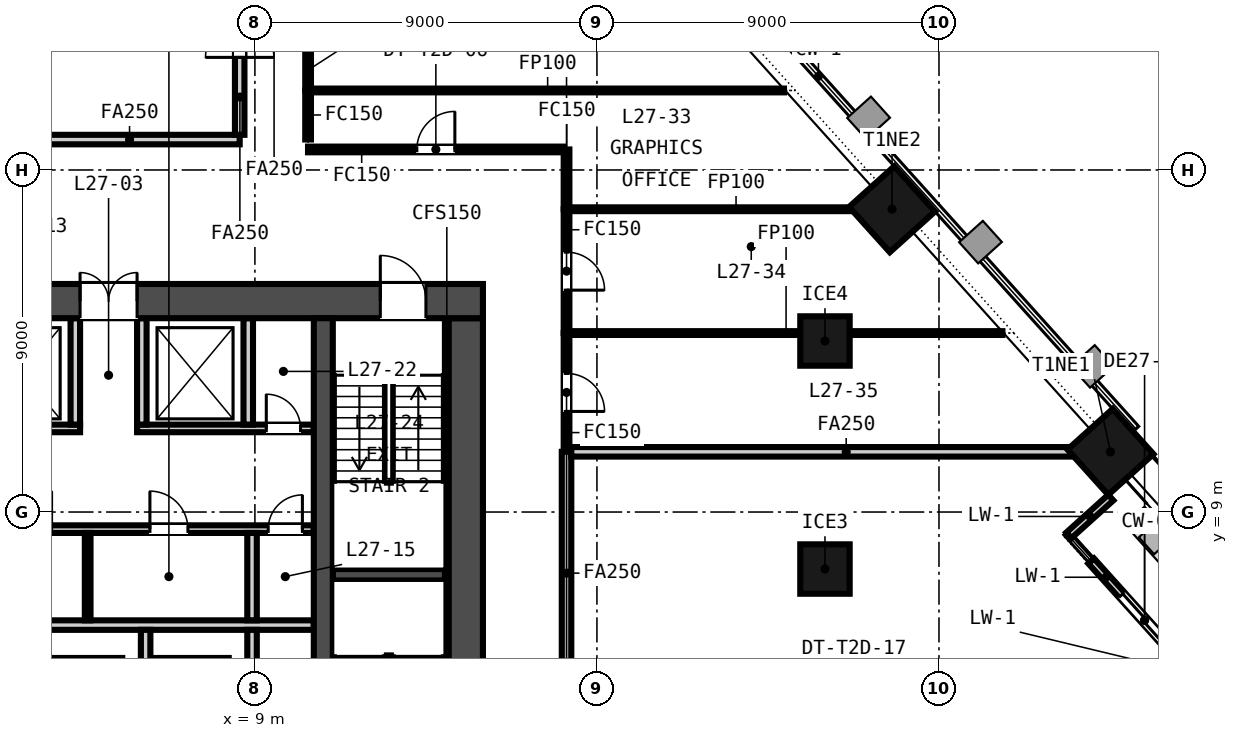
"""IFC4 building model, lengths in metres.
Left out: names, types, materials, properties, quantities, classifications, styles, units other than length and angle.
Written with IfcOpenShell. Run it as: python <this file> out.ifc"""

import sys

from ifc_helpers import new_model, si_unit, direction, frame, frame_2d, origin, origin_2d, place, context, subcontext, project, spatial, rectangle, extrude, element, fill, save


model = new_model("IFC4")
c1 = context("Model", 3, precision=1e-05, world=origin(), true_north=direction((0.0, 1.0)))
c2 = subcontext(c1, "Body", "Model", "MODEL_VIEW")
j1 = project(units=[si_unit("LENGTHUNIT", "METRE"), si_unit("PLANEANGLEUNIT", "RADIAN")], contexts=[c1])
p1 = place(None, origin())
s1 = spatial("IfcSite", under=j1, at=p1, CompositionType="ELEMENT")
p2 = place(p1, origin())
s2 = spatial("IfcBuilding", under=s1, at=p2, CompositionType="ELEMENT")
p3 = place(p2, frame((0.0, 0.0, 113.5)))
s3 = spatial("IfcBuildingStorey", under=s2, at=p3, CompositionType="ELEMENT", Elevation=113.5)
p4 = place(p3, frame((-15.0, 14.55, -0.15), z_axis=(0.0, 0.0, 1.0), x_axis=(1.0, 0.0, 0.0)))
e1 = element("IfcWall", 1, at=p4, inside=s3, PredefinedType="SOLIDWALL", context=c2, shape_type="SweptSolid", body=[
    extrude(rectangle(XDim=30.0, YDim=0.9, at=frame_2d((15.0, 0.0))), origin(), (0.0, 0.0, 1.0), 3.5),
])
p5 = place(p4, frame((9.25, 0.0, 0.15)))
e2 = element("IfcOpeningElement", 2, at=p5, cuts=e1, PredefinedType="OPENING", context=c2, shape_type="SweptSolid", body=[
    extrude(rectangle(XDim=1.5, YDim=2.1, at=frame_2d((0.75, 1.05))), frame((0.0, 0.46, 0.0), z_axis=(0.0, -1.0, 0.0), x_axis=(1.0, 0.0, 0.0)), (0.0, 0.0, 1.0), 0.92),
])
p6 = place(p4, frame((19.4, 0.0, 0.15)))
e3 = element("IfcOpeningElement", 3, at=p6, cuts=e1, PredefinedType="OPENING", context=c2, shape_type="SweptSolid", body=[
    extrude(rectangle(XDim=1.5, YDim=2.1, at=frame_2d((0.75, 1.05))), frame((0.0, 0.46, 0.0), z_axis=(0.0, -1.0, 0.0), x_axis=(1.0, 0.0, 0.0)), (0.0, 0.0, 1.0), 0.92),
])
p7 = place(p4, frame((1.5, 0.0, 0.15)))
e4 = element("IfcOpeningElement", 4, at=p7, cuts=e1, PredefinedType="OPENING", context=c2, shape_type="SweptSolid", body=[
    extrude(rectangle(XDim=1.2, YDim=2.1, at=frame_2d((0.6, 1.05))), frame((0.0, 0.46, 0.0), z_axis=(0.0, -1.0, 0.0), x_axis=(1.0, 0.0, 0.0)), (0.0, 0.0, 1.0), 0.92),
])
p8 = place(p4, frame((27.3, 0.0, 0.15)))
e5 = element("IfcOpeningElement", 5, at=p8, cuts=e1, PredefinedType="OPENING", context=c2, shape_type="SweptSolid", body=[
    extrude(rectangle(XDim=1.2, YDim=2.1, at=frame_2d((0.6, 1.05))), frame((0.0, 0.46, 0.0), z_axis=(0.0, -1.0, 0.0), x_axis=(1.0, 0.0, 0.0)), (0.0, 0.0, 1.0), 0.92),
])
p9 = place(p3, frame((14.55, 0.9, -0.15), z_axis=(0.0, 0.0, 1.0), x_axis=(0.0, 1.0, 0.0)))
e6 = element("IfcWall", 6, at=p9, inside=s3, PredefinedType="SOLIDWALL", context=c2, shape_type="SweptSolid", body=[
    extrude(rectangle(XDim=13.2, YDim=0.9, at=frame_2d((6.6, 0.0))), origin(), (0.0, 0.0, 1.0), 3.5),
])
p10 = place(p3, frame((10.8, 0.9, -0.15), z_axis=(0.0, 0.0, 1.0), x_axis=(0.0, 1.0, 0.0)))
e7 = element("IfcWall", 7, at=p10, inside=s3, PredefinedType="SOLIDWALL", context=c2, shape_type="SweptSolid", body=[
    extrude(rectangle(XDim=13.2, YDim=0.5, at=frame_2d((6.6, 0.0))), origin(), (0.0, 0.0, 1.0), 3.5),
])
for number, where, z_axis, x_axis in (
    (8, (31.513, 10.584, -0.15), (0.0, 0.0, 1.0), (-0.669, 0.743, 0.0)),
    (9, (25.765, 16.967, -0.15), (0.0, 0.0, 1.0), (-0.669, 0.743, 0.0)),
):
    element("IfcColumn", number, at=place(p3, frame(where, z_axis=z_axis, x_axis=x_axis)), inside=s3, PredefinedType="COLUMN", context=c2, shape_type="SweptSolid", body=[
        extrude(rectangle(XDim=1.6, YDim=1.6, at=origin_2d()), origin(), (0.0, 0.0, 1.0), 3.5),
    ])
for number, where, z_axis, x_axis in (
    (10, (24.0, 7.5, -0.15), (0.0, 0.0, 1.0), (1.0, 0.0, 0.0)),
    (11, (24.0, 13.5, -0.15), (0.0, 0.0, 1.0), (1.0, 0.0, 0.0)),
):
    element("IfcColumn", number, at=place(p3, frame(where, z_axis=z_axis, x_axis=x_axis)), inside=s3, PredefinedType="COLUMN", context=c2, shape_type="SweptSolid", body=[
        extrude(rectangle(XDim=1.3, YDim=1.3, at=origin_2d()), origin(), (0.0, 0.0, 1.0), 3.5),
    ])
p11 = place(p3, frame((33.815, 4.59, 0.0), z_axis=(0.0, 0.0, 1.0), x_axis=(-0.669138140895, 0.743138041282, 0.0)))
e12 = element("IfcWall", 12, at=p11, inside=s3, PredefinedType="SOLIDWALL", context=c2, shape_type="SweptSolid", body=[
    extrude(rectangle(XDim=4.2, YDim=0.2, at=frame_2d((2.1, 0.0))), origin(), (0.0, 0.0, 1.0), 2.671),
])
p12 = place(p11, frame((1.2, 0.0, 0.0)))
e13 = element("IfcOpeningElement", 13, at=p12, cuts=e12, PredefinedType="OPENING", context=c2, shape_type="SweptSolid", body=[
    extrude(rectangle(XDim=1.8, YDim=2.4, at=frame_2d((0.9, 1.2))), frame((0.0, 0.11, 0.0), z_axis=(0.0, -1.0, 0.0), x_axis=(1.0, 0.0, 0.0)), (0.0, 0.0, 1.0), 0.22),
])
p13 = place(p3, frame((31.521, 9.38, 0.0), z_axis=(0.0, 0.0, 1.0), x_axis=(-0.743073249722, -0.669210090739, 0.0)))
e14 = element("IfcWall", 14, at=p13, inside=s3, PredefinedType="SOLIDWALL", context=c2, shape_type="SweptSolid", body=[
    extrude(rectangle(XDim=1.484, YDim=0.2, at=frame_2d((0.742, 0.0))), origin(), (0.0, 0.0, 1.0), 2.9),
])
p14 = place(p3, frame((-10.55, 6.025, 0.0), z_axis=(0.0, 0.0, 1.0), x_axis=(1.0, 0.0, 0.0)))
e15 = element("IfcWall", 15, at=p14, inside=s3, PredefinedType="PARTITIONING", context=c2, shape_type="SweptSolid", body=[
    extrude(rectangle(XDim=21.1, YDim=0.25, at=frame_2d((10.55, 0.0))), origin(), (0.0, 0.0, 1.0), 3.35),
])
p15 = place(p3, frame((-4.125, 8.55, 0.0), z_axis=(0.0, 0.0, 1.0), x_axis=(1.0, 0.0, 0.0)))
e16 = element("IfcWall", 16, at=p15, inside=s3, PredefinedType="PARTITIONING", context=c2, shape_type="SweptSolid", body=[
    extrude(rectangle(XDim=14.675, YDim=0.2, at=frame_2d((7.337, 0.0))), origin(), (0.0, 0.0, 1.0), 3.35),
])
p16 = place(p15, frame((2.438, 0.0, 0.0)))
e17 = element("IfcOpeningElement", 17, at=p16, cuts=e16, PredefinedType="OPENING", context=c2, shape_type="SweptSolid", body=[
    extrude(rectangle(XDim=1.0, YDim=2.1, at=frame_2d((0.5, 1.05))), frame((0.0, 0.11, 0.0), z_axis=(0.0, -1.0, 0.0), x_axis=(1.0, 0.0, 0.0)), (0.0, 0.0, 1.0), 0.22),
])
p17 = place(p15, frame((6.775, 0.0, 0.0)))
e18 = element("IfcOpeningElement", 18, at=p17, cuts=e16, PredefinedType="OPENING", context=c2, shape_type="SweptSolid", body=[
    extrude(rectangle(XDim=1.0, YDim=2.1, at=frame_2d((0.5, 1.05))), frame((0.0, 0.11, 0.0), z_axis=(0.0, -1.0, 0.0), x_axis=(1.0, 0.0, 0.0)), (0.0, 0.0, 1.0), 0.22),
])
p18 = place(p15, frame((10.363, 0.0, 0.0)))
e19 = element("IfcOpeningElement", 19, at=p18, cuts=e16, PredefinedType="OPENING", context=c2, shape_type="SweptSolid", body=[
    extrude(rectangle(XDim=1.0, YDim=2.1, at=frame_2d((0.5, 1.05))), frame((0.0, 0.11, 0.0), z_axis=(0.0, -1.0, 0.0), x_axis=(1.0, 0.0, 0.0)), (0.0, 0.0, 1.0), 0.22),
])
p19 = place(p15, frame((13.475, 0.0, 0.0)))
e20 = element("IfcOpeningElement", 20, at=p19, cuts=e16, PredefinedType="OPENING", context=c2, shape_type="SweptSolid", body=[
    extrude(rectangle(XDim=0.9, YDim=2.1, at=frame_2d((0.45, 1.05))), frame((0.0, 0.11, 0.0), z_axis=(0.0, -1.0, 0.0), x_axis=(1.0, 0.0, 0.0)), (0.0, 0.0, 1.0), 0.22),
])
p20 = place(p3, frame((-4.25, 11.2, 0.0), z_axis=(0.0, 0.0, 1.0), x_axis=(1.0, 0.0, 0.0)))
e21 = element("IfcWall", 21, at=p20, inside=s3, PredefinedType="PARTITIONING", context=c2, shape_type="SweptSolid", body=[
    extrude(rectangle(XDim=8.65, YDim=0.2, at=frame_2d((4.325, 0.0))), origin(), (0.0, 0.0, 1.0), 3.35),
])
p21 = place(p20, frame((0.825, 0.0, 0.0)))
e22 = element("IfcOpeningElement", 22, at=p21, cuts=e21, PredefinedType="OPENING", context=c2, shape_type="SweptSolid", body=[
    extrude(rectangle(XDim=1.4, YDim=2.1, at=frame_2d((0.7, 1.05))), frame((0.0, 0.11, 0.0), z_axis=(0.0, -1.0, 0.0), x_axis=(1.0, 0.0, 0.0)), (0.0, 0.0, 1.0), 0.22),
])
p22 = place(p20, frame((3.625, 0.0, 0.0)))
e23 = element("IfcOpeningElement", 23, at=p22, cuts=e21, PredefinedType="OPENING", context=c2, shape_type="SweptSolid", body=[
    extrude(rectangle(XDim=1.4, YDim=2.1, at=frame_2d((0.7, 1.05))), frame((0.0, 0.11, 0.0), z_axis=(0.0, -1.0, 0.0), x_axis=(1.0, 0.0, 0.0)), (0.0, 0.0, 1.0), 0.22),
])
p23 = place(p3, frame((5.9, 11.2, 0.0), z_axis=(0.0, 0.0, 1.0), x_axis=(1.0, 0.0, 0.0)))
e24 = element("IfcWall", 24, at=p23, inside=s3, PredefinedType="PARTITIONING", context=c2, shape_type="SweptSolid", body=[
    extrude(rectangle(XDim=4.65, YDim=0.2, at=frame_2d((2.325, 0.0))), origin(), (0.0, 0.0, 1.0), 3.35),
])
p24 = place(p23, frame((3.4, 0.0, 0.0)))
e25 = element("IfcOpeningElement", 25, at=p24, cuts=e24, PredefinedType="OPENING", context=c2, shape_type="SweptSolid", body=[
    extrude(rectangle(XDim=0.9, YDim=2.1, at=frame_2d((0.45, 1.05))), frame((0.0, 0.11, 0.0), z_axis=(0.0, -1.0, 0.0), x_axis=(1.0, 0.0, 0.0)), (0.0, 0.0, 1.0), 0.22),
])
for number, where, z_axis, x_axis in (
    (26, (6.125, 3.6, 0.0), (0.0, 0.0, 1.0), (0.0, 1.0, 0.0)),
    (27, (8.925, 3.6, 0.0), (0.0, 0.0, 1.0), (0.0, 1.0, 0.0)),
):
    element("IfcWall", number, at=place(p3, frame(where, z_axis=z_axis, x_axis=x_axis)), inside=s3, PredefinedType="PARTITIONING", context=c2, shape_type="SweptSolid", body=[
        extrude(rectangle(XDim=2.3, YDim=0.25, at=frame_2d((1.15, 0.0))), origin(), (0.0, 0.0, 1.0), 3.35),
    ])
p25 = place(p3, frame((4.6, 6.15, 0.0), z_axis=(0.0, 0.0, 1.0), x_axis=(0.0, 1.0, 0.0)))
e28 = element("IfcWall", 28, at=p25, inside=s3, PredefinedType="PARTITIONING", context=c2, shape_type="SweptSolid", body=[
    extrude(rectangle(XDim=2.3, YDim=0.15, at=frame_2d((1.15, 0.0))), origin(), (0.0, 0.0, 1.0), 3.35),
])
p26 = place(p3, frame((8.925, 6.15, 0.0), z_axis=(0.0, 0.0, 1.0), x_axis=(0.0, 1.0, 0.0)))
e29 = element("IfcWall", 29, at=p26, inside=s3, PredefinedType="PARTITIONING", context=c2, shape_type="SweptSolid", body=[
    extrude(rectangle(XDim=2.3, YDim=0.25, at=frame_2d((1.15, 0.0))), origin(), (0.0, 0.0, 1.0), 3.35),
])
for number, where, z_axis, x_axis in (
    (30, (4.275, 11.3, 0.0), (0.0, 0.0, 1.0), (0.0, 1.0, 0.0)),
    (31, (6.025, 11.3, 0.0), (0.0, 0.0, 1.0), (0.0, 1.0, 0.0)),
    (32, (8.825, 11.3, 0.0), (0.0, 0.0, 1.0), (0.0, 1.0, 0.0)),
):
    element("IfcWall", number, at=place(p3, frame(where, z_axis=z_axis, x_axis=x_axis)), inside=s3, PredefinedType="PARTITIONING", context=c2, shape_type="SweptSolid", body=[
        extrude(rectangle(XDim=2.8, YDim=0.25, at=frame_2d((1.4, 0.0))), origin(), (0.0, 0.0, 1.0), 3.35),
    ])
p27 = place(p3, frame((11.05, 7.35, 0.0), z_axis=(0.0, 0.0, 1.0), x_axis=(1.0, 0.0, 0.0)))
e33 = element("IfcWall", 33, at=p27, inside=s3, PredefinedType="SOLIDWALL", context=c2, shape_type="SweptSolid", body=[
    extrude(rectangle(XDim=2.95, YDim=0.3, at=frame_2d((1.475, 0.0))), origin(), (0.0, 0.0, 1.0), 3.35),
])
p28 = place(p3, frame((14.05, 0.9, 0.0), z_axis=(0.0, 0.0, 1.0), x_axis=(0.0, 1.0, 0.0)))
e34 = element("IfcWall", 34, at=p28, inside=s3, PredefinedType="SOLIDWALL", context=c2, shape_type="SweptSolid", body=[
    extrude(rectangle(XDim=13.2, YDim=0.1, at=frame_2d((6.6, 0.0))), origin(), (0.0, 0.0, 1.0), 3.35),
])
p29 = place(p3, frame((10.4, 23.35, 0.0), z_axis=(0.0, 0.0, 1.0), x_axis=(0.0, -1.0, 0.0)))
e35 = element("IfcWall", 35, at=p29, inside=s3, PredefinedType="PARTITIONING", context=c2, shape_type="SweptSolid", body=[
    extrude(rectangle(XDim=3.258, YDim=0.15, at=frame_2d((1.629, 0.0))), origin(), (0.0, 0.0, 1.0), 2.591),
])
p30 = place(p29, frame((1.129, 0.0, 0.0)))
e36 = element("IfcOpeningElement", 36, at=p30, cuts=e35, PredefinedType="OPENING", context=c2, shape_type="SweptSolid", body=[
    extrude(rectangle(XDim=1.0, YDim=2.1, at=frame_2d((0.5, 1.05))), frame((0.0, 0.085, 0.0), z_axis=(0.0, -1.0, 0.0), x_axis=(1.0, 0.0, 0.0)), (0.0, 0.0, 1.0), 0.17),
])
p31 = place(p3, frame((10.4, 20.092, 0.0), z_axis=(0.0, 0.0, 1.0), x_axis=(0.0, -1.0, 0.0)))
e37 = element("IfcWall", 37, at=p31, inside=s3, PredefinedType="PARTITIONING", context=c2, shape_type="SweptSolid", body=[
    extrude(rectangle(XDim=1.29, YDim=0.15, at=frame_2d((0.645, 0.0))), origin(), (0.0, 0.0, 1.0), 2.591),
])
p32 = place(p3, frame((17.2, 18.54, 0.0), z_axis=(0.0, 0.0, 1.0), x_axis=(0.0, -1.0, 0.0)))
e38 = element("IfcWall", 38, at=p32, inside=s3, PredefinedType="PARTITIONING", context=c2, shape_type="SweptSolid", body=[
    extrude(rectangle(XDim=1.573, YDim=0.15, at=frame_2d((0.787, 0.0))), origin(), (0.0, 0.0, 1.0), 2.591),
])
p33 = place(p3, frame((17.2, 16.967, 0.0), z_axis=(0.0, 0.0, 1.0), x_axis=(0.0, -1.0, 0.0)))
e39 = element("IfcWall", 39, at=p33, inside=s3, PredefinedType="PARTITIONING", context=c2, shape_type="SweptSolid", body=[
    extrude(rectangle(XDim=3.258, YDim=0.15, at=frame_2d((1.629, 0.0))), origin(), (0.0, 0.0, 1.0), 2.591),
])
p34 = place(p33, frame((1.129, 0.0, 0.0)))
e40 = element("IfcOpeningElement", 40, at=p34, cuts=e39, PredefinedType="OPENING", context=c2, shape_type="SweptSolid", body=[
    extrude(rectangle(XDim=1.0, YDim=2.1, at=frame_2d((0.5, 1.05))), frame((0.0, 0.085, 0.0), z_axis=(0.0, -1.0, 0.0), x_axis=(1.0, 0.0, 0.0)), (0.0, 0.0, 1.0), 0.17),
])
p35 = place(p3, frame((17.2, 13.709, 0.0), z_axis=(0.0, 0.0, 1.0), x_axis=(0.0, -1.0, 0.0)))
e41 = element("IfcWall", 41, at=p35, inside=s3, PredefinedType="PARTITIONING", context=c2, shape_type="SweptSolid", body=[
    extrude(rectangle(XDim=3.125, YDim=0.15, at=frame_2d((1.562, 0.0))), origin(), (0.0, 0.0, 1.0), 2.591),
])
p36 = place(p35, frame((1.062, 0.0, 0.0)))
e42 = element("IfcOpeningElement", 42, at=p36, cuts=e41, PredefinedType="OPENING", context=c2, shape_type="SweptSolid", body=[
    extrude(rectangle(XDim=1.0, YDim=2.1, at=frame_2d((0.5, 1.05))), frame((0.0, 0.085, 0.0), z_axis=(0.0, -1.0, 0.0), x_axis=(1.0, 0.0, 0.0)), (0.0, 0.0, 1.0), 0.17),
])
p37 = place(p3, frame((17.2, 10.584, 0.0), z_axis=(0.0, 0.0, 1.0), x_axis=(0.0, -1.0, 0.0)))
e43 = element("IfcWall", 43, at=p37, inside=s3, PredefinedType="PARTITIONING", context=c2, shape_type="SweptSolid", body=[
    extrude(rectangle(XDim=6.384, YDim=0.25, at=frame_2d((3.192, 0.0))), origin(), (0.0, 0.0, 1.0), 2.591),
])
p38 = place(p3, frame((-4.912, 18.8, 0.0), z_axis=(0.0, 0.0, 1.0), x_axis=(1.0, 0.0, 0.0)))
e44 = element("IfcWall", 44, at=p38, inside=s3, PredefinedType="PARTITIONING", context=c2, shape_type="SweptSolid", body=[
    extrude(rectangle(XDim=13.512, YDim=0.25, at=frame_2d((6.756, 0.0))), origin(), (0.0, 0.0, 1.0), 2.591),
])
p39 = place(p38, frame((5.856, 0.0, 0.0)))
e45 = element("IfcOpeningElement", 45, at=p39, cuts=e44, PredefinedType="OPENING", context=c2, shape_type="SweptSolid", body=[
    extrude(rectangle(XDim=1.8, YDim=2.1, at=frame_2d((0.9, 1.05))), frame((0.0, 0.135, 0.0), z_axis=(0.0, -1.0, 0.0), x_axis=(1.0, 0.0, 0.0)), (0.0, 0.0, 1.0), 0.27),
])
p40 = place(p3, frame((8.6, 18.925, 0.0), z_axis=(0.0, 0.0, 1.0), x_axis=(0.0, 1.0, 0.0)))
e46 = element("IfcWall", 46, at=p40, inside=s3, PredefinedType="PARTITIONING", context=c2, shape_type="SweptSolid", body=[
    extrude(rectangle(XDim=5.875, YDim=0.25, at=frame_2d((2.938, 0.0))), origin(), (0.0, 0.0, 1.0), 2.591),
])
p41 = place(p40, frame((2.038, 0.0, 0.0)))
e47 = element("IfcOpeningElement", 47, at=p41, cuts=e46, PredefinedType="OPENING", context=c2, shape_type="SweptSolid", body=[
    extrude(rectangle(XDim=1.8, YDim=2.1, at=frame_2d((0.9, 1.05))), frame((0.0, 0.135, 0.0), z_axis=(0.0, -1.0, 0.0), x_axis=(1.0, 0.0, 0.0)), (0.0, 0.0, 1.0), 0.27),
])
p42 = place(p3, frame((10.475, 20.092, 0.0), z_axis=(0.0, 0.0, 1.0), x_axis=(1.0, 0.0, 0.0)))
e48 = element("IfcWall", 48, at=p42, inside=s3, PredefinedType="PARTITIONING", context=c2, shape_type="SweptSolid", body=[
    extrude(rectangle(XDim=12.446, YDim=0.1, at=frame_2d((6.223, 0.0))), origin(), (0.0, 0.0, 1.0), 2.591),
])
p43 = place(p3, frame((10.398, 18.54, 0.0), z_axis=(0.0, 0.0, 1.0), x_axis=(1.0, 0.0, 0.0)))
e49 = element("IfcWall", 49, at=p43, inside=s3, PredefinedType="PARTITIONING", context=c2, shape_type="SweptSolid", body=[
    extrude(rectangle(XDim=6.727, YDim=0.15, at=frame_2d((3.364, 0.0))), origin(), (0.0, 0.0, 1.0), 2.591),
])
p44 = place(p43, frame((2.864, 0.0, 0.0)))
e50 = element("IfcOpeningElement", 50, at=p44, cuts=e49, PredefinedType="OPENING", context=c2, shape_type="SweptSolid", body=[
    extrude(rectangle(XDim=1.0, YDim=2.1, at=frame_2d((0.5, 1.05))), frame((0.0, 0.085, 0.0), z_axis=(0.0, -1.0, 0.0), x_axis=(1.0, 0.0, 0.0)), (0.0, 0.0, 1.0), 0.17),
])
p45 = place(p3, frame((17.275, 16.967, 0.0), z_axis=(0.0, 0.0, 1.0), x_axis=(1.0, 0.0, 0.0)))
e51 = element("IfcWall", 51, at=p45, inside=s3, PredefinedType="PARTITIONING", context=c2, shape_type="SweptSolid", body=[
    extrude(rectangle(XDim=8.76, YDim=0.1, at=frame_2d((4.38, 0.0))), origin(), (0.0, 0.0, 1.0), 2.591),
])
p46 = place(p3, frame((17.275, 13.709, 0.0), z_axis=(0.0, 0.0, 1.0), x_axis=(1.0, 0.0, 0.0)))
e52 = element("IfcWall", 52, at=p46, inside=s3, PredefinedType="PARTITIONING", context=c2, shape_type="SweptSolid", body=[
    extrude(rectangle(XDim=11.393, YDim=0.1, at=frame_2d((5.697, 0.0))), origin(), (0.0, 0.0, 1.0), 2.591),
])
p47 = place(p3, frame((17.325, 10.584, 0.0), z_axis=(0.0, 0.0, 1.0), x_axis=(1.0, 0.0, 0.0)))
e53 = element("IfcWall", 53, at=p47, inside=s3, PredefinedType="PARTITIONING", context=c2, shape_type="SweptSolid", body=[
    extrude(rectangle(XDim=14.457, YDim=0.25, at=frame_2d((7.229, 0.0))), origin(), (0.0, 0.0, 1.0), 2.591),
])
p48 = place(p12, origin())
e54 = element("IfcDoor", 54, at=p48, inside=s3, OperationType="SINGLE_SWING_LEFT", PredefinedType="DOOR", context=c2, shape_type="SweptSolid", body=[
    extrude(rectangle(XDim=1.8, YDim=2.4, at=frame_2d((0.9, 1.2))), frame((0.0, 0.025, 0.0), z_axis=(0.0, -1.0, 0.0), x_axis=(1.0, 0.0, 0.0)), (0.0, 0.0, 1.0), 0.05),
])
fill(e13, e54)
p49 = place(p18, origin())
e55 = element("IfcDoor", 55, at=p49, inside=s3, OperationType="SINGLE_SWING_LEFT", PredefinedType="DOOR", context=c2, shape_type="SweptSolid", body=[
    extrude(rectangle(XDim=1.0, YDim=2.1, at=frame_2d((0.5, 1.05))), frame((0.0, 0.025, 0.0), z_axis=(0.0, -1.0, 0.0), x_axis=(1.0, 0.0, 0.0)), (0.0, 0.0, 1.0), 0.05),
])
fill(e19, e55)
p50 = place(p19, origin())
e56 = element("IfcDoor", 56, at=p50, inside=s3, OperationType="SINGLE_SWING_RIGHT", PredefinedType="DOOR", context=c2, shape_type="SweptSolid", body=[
    extrude(rectangle(XDim=0.9, YDim=2.1, at=frame_2d((0.45, 1.05))), frame((0.0, 0.025, 0.0), z_axis=(0.0, -1.0, 0.0), x_axis=(1.0, 0.0, 0.0)), (0.0, 0.0, 1.0), 0.05),
])
fill(e20, e56)
p51 = place(p24, origin())
e57 = element("IfcDoor", 57, at=p51, inside=s3, OperationType="SINGLE_SWING_LEFT", PredefinedType="DOOR", context=c2, shape_type="SweptSolid", body=[
    extrude(rectangle(XDim=0.9, YDim=2.1, at=frame_2d((0.45, 1.05))), frame((0.0, 0.025, 0.0), z_axis=(0.0, -1.0, 0.0), x_axis=(1.0, 0.0, 0.0)), (0.0, 0.0, 1.0), 0.05),
])
fill(e25, e57)
p52 = place(p6, origin())
e58 = element("IfcDoor", 58, at=p52, inside=s3, OperationType="DOUBLE_DOOR_SINGLE_SWING", PredefinedType="DOOR", context=c2, shape_type="SweptSolid", body=[
    extrude(rectangle(XDim=1.5, YDim=2.1, at=frame_2d((0.75, 1.05))), frame((0.0, 0.025, 0.0), z_axis=(0.0, -1.0, 0.0), x_axis=(1.0, 0.0, 0.0)), (0.0, 0.0, 1.0), 0.05),
])
fill(e3, e58)
p53 = place(p8, origin())
e59 = element("IfcDoor", 59, at=p53, inside=s3, OperationType="SINGLE_SWING_LEFT", PredefinedType="DOOR", context=c2, shape_type="SweptSolid", body=[
    extrude(rectangle(XDim=1.2, YDim=2.1, at=frame_2d((0.6, 1.05))), frame((0.0, 0.025, 0.0), z_axis=(0.0, -1.0, 0.0), x_axis=(1.0, 0.0, 0.0)), (0.0, 0.0, 1.0), 0.05),
])
fill(e5, e59)
p54 = place(p41, origin())
e60 = element("IfcDoor", 60, at=p54, inside=s3, OperationType="DOUBLE_DOOR_DOUBLE_SWING", PredefinedType="DOOR", context=c2, shape_type="SweptSolid", body=[
    extrude(rectangle(XDim=1.8, YDim=2.1, at=frame_2d((0.9, 1.05))), frame((0.0, 0.025, 0.0), z_axis=(0.0, -1.0, 0.0), x_axis=(1.0, 0.0, 0.0)), (0.0, 0.0, 1.0), 0.05),
])
fill(e47, e60)
p55 = place(p44, origin())
e61 = element("IfcDoor", 61, at=p55, inside=s3, OperationType="SINGLE_SWING_RIGHT", PredefinedType="DOOR", context=c2, shape_type="SweptSolid", body=[
    extrude(rectangle(XDim=1.0, YDim=2.1, at=frame_2d((0.5, 1.05))), frame((0.0, 0.025, 0.0), z_axis=(0.0, -1.0, 0.0), x_axis=(1.0, 0.0, 0.0)), (0.0, 0.0, 1.0), 0.05),
])
fill(e50, e61)
p56 = place(p34, origin())
e62 = element("IfcDoor", 62, at=p56, inside=s3, OperationType="SINGLE_SWING_RIGHT", PredefinedType="DOOR", context=c2, shape_type="SweptSolid", body=[
    extrude(rectangle(XDim=1.0, YDim=2.1, at=frame_2d((0.5, 1.05))), frame((0.0, 0.025, 0.0), z_axis=(0.0, -1.0, 0.0), x_axis=(1.0, 0.0, 0.0)), (0.0, 0.0, 1.0), 0.05),
])
fill(e40, e62)
p57 = place(p36, origin())
e63 = element("IfcDoor", 63, at=p57, inside=s3, OperationType="SINGLE_SWING_RIGHT", PredefinedType="DOOR", context=c2, shape_type="SweptSolid", body=[
    extrude(rectangle(XDim=1.0, YDim=2.1, at=frame_2d((0.5, 1.05))), frame((0.0, 0.025, 0.0), z_axis=(0.0, -1.0, 0.0), x_axis=(1.0, 0.0, 0.0)), (0.0, 0.0, 1.0), 0.05),
])
fill(e42, e63)
save(model, sys.argv[1])
